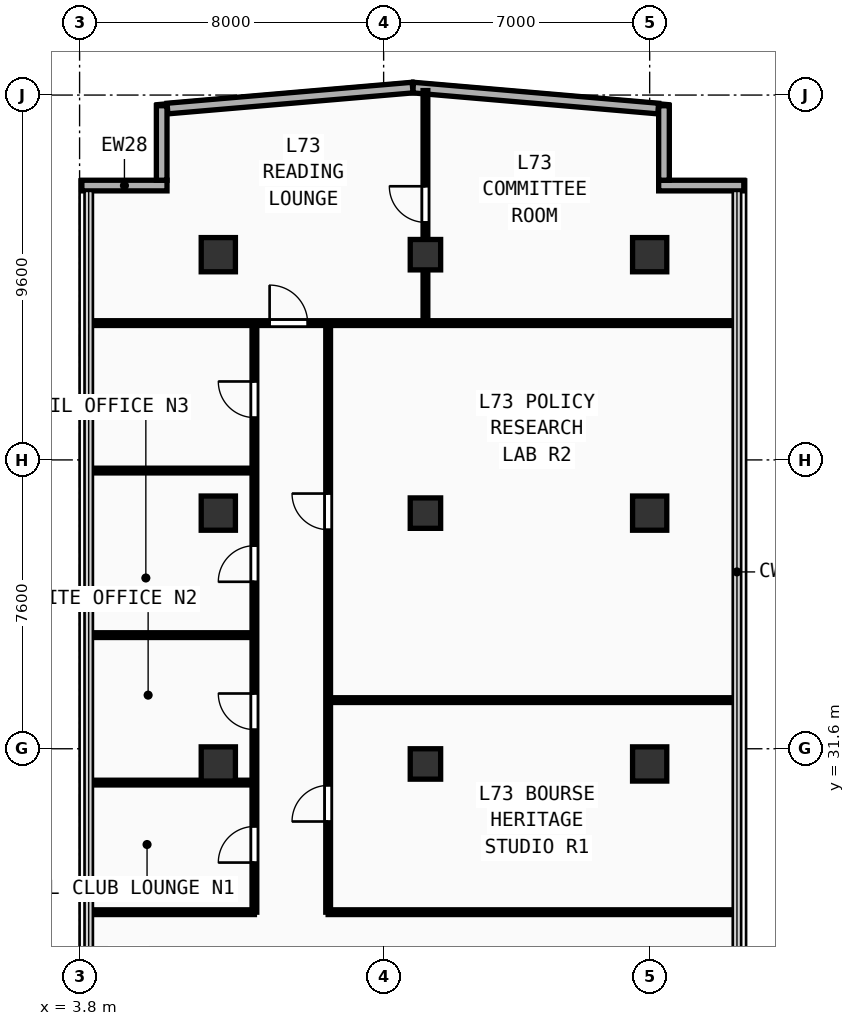
"""IFC4 building model, lengths in metres.
Left out: names, types, materials, properties, quantities, classifications, styles, units other than length and angle.
Written with IfcOpenShell. Run it as: python <this file> out.ifc"""

import sys

from ifc_helpers import new_model, si_unit, direction, frame, frame_2d, origin, origin_2d, place, context, subcontext, project, spatial, rectangle, extrude, element, fill, save


model = new_model("IFC4")
c1 = context("Model", 3, precision=1e-05, world=origin(), true_north=direction((0.0, 1.0)))
c2 = subcontext(c1, "Body", "Model", "MODEL_VIEW")
j1 = project(units=[si_unit("LENGTHUNIT", "METRE"), si_unit("PLANEANGLEUNIT", "RADIAN")], contexts=[c1])
p1 = place(None, origin())
s1 = spatial("IfcSite", under=j1, at=p1, CompositionType="ELEMENT")
p2 = place(p1, origin())
s2 = spatial("IfcBuilding", under=s1, at=p2, CompositionType="ELEMENT")
p3 = place(p2, frame((0.0, 0.0, 285.6)))
s3 = spatial("IfcBuildingStorey", under=s2, at=p3, CompositionType="ELEMENT", Elevation=285.6)
for number, where, z_axis, x_axis in (
    (1, (7.45, 31.2, 0.0), (0.0, 0.0, 1.0), (1.0, 0.0, 0.0)),
    (2, (7.45, 37.8, 0.0), (0.0, 0.0, 1.0), (1.0, 0.0, 0.0)),
    (3, (7.45, 44.6, 0.0), (0.0, 0.0, 1.0), (1.0, 0.0, 0.0)),
    (4, (18.8, 31.2, 0.0), (0.0, 0.0, 1.0), (1.0, 0.0, 0.0)),
    (5, (18.8, 37.8, 0.0), (0.0, 0.0, 1.0), (1.0, 0.0, 0.0)),
    (6, (18.8, 44.6, 0.0), (0.0, 0.0, 1.0), (1.0, 0.0, 0.0)),
):
    element("IfcColumn", number, at=place(p3, frame(where, z_axis=z_axis, x_axis=x_axis)), inside=s3, PredefinedType="COLUMN", context=c2, shape_type="SweptSolid", body=[
        extrude(rectangle(XDim=0.9, YDim=0.9, at=origin_2d()), origin(), (0.0, 0.0, 1.0), 3.56),
    ])
for number, where, z_axis, x_axis in (
    (7, (12.9, 31.2, 0.0), (0.0, 0.0, 1.0), (1.0, 0.0, 0.0)),
    (8, (12.9, 37.8, 0.0), (0.0, 0.0, 1.0), (1.0, 0.0, 0.0)),
    (9, (12.9, 44.6, 0.0), (0.0, 0.0, 1.0), (1.0, 0.0, 0.0)),
):
    element("IfcColumn", number, at=place(p3, frame(where, z_axis=z_axis, x_axis=x_axis)), inside=s3, PredefinedType="COLUMN", context=c2, shape_type="SweptSolid", body=[
        extrude(rectangle(XDim=0.8, YDim=0.8, at=origin_2d()), origin(), (0.0, 0.0, 1.0), 3.56),
    ])
p4 = place(p3, frame((19.037, 46.419, 0.0), z_axis=(0.0, 0.0, 1.0), x_axis=(1.0, 0.0, 0.0)))
e10 = element("IfcWall", 10, at=p4, inside=s3, PredefinedType="SOLIDWALL", context=c2, shape_type="SweptSolid", body=[
    extrude(rectangle(XDim=2.24, YDim=0.28, at=frame_2d((1.12, 0.0))), origin(), (0.0, 0.0, 1.0), 3.56),
])
p5 = place(p3, frame((19.177, 46.559, 0.0), z_axis=(0.0, 0.0, 1.0), x_axis=(0.0, 1.0, 0.0)))
e11 = element("IfcWall", 11, at=p5, inside=s3, PredefinedType="SOLIDWALL", context=c2, shape_type="SweptSolid", body=[
    extrude(rectangle(XDim=1.96, YDim=0.28, at=frame_2d((0.98, 0.0))), origin(), (0.0, 0.0, 1.0), 3.56),
])
p6 = place(p3, frame((3.86, 46.419, 0.0), z_axis=(0.0, 0.0, 1.0), x_axis=(1.0, 0.0, 0.0)))
e12 = element("IfcWall", 12, at=p6, inside=s3, PredefinedType="SOLIDWALL", context=c2, shape_type="SweptSolid", body=[
    extrude(rectangle(XDim=2.24, YDim=0.28, at=frame_2d((1.12, 0.0))), origin(), (0.0, 0.0, 1.0), 3.56),
])
p7 = place(p3, frame((5.96, 46.559, 0.0), z_axis=(0.0, 0.0, 1.0), x_axis=(0.0, 1.0, 0.0)))
e13 = element("IfcWall", 13, at=p7, inside=s3, PredefinedType="SOLIDWALL", context=c2, shape_type="SweptSolid", body=[
    extrude(rectangle(XDim=1.96, YDim=0.28, at=frame_2d((0.98, 0.0))), origin(), (0.0, 0.0, 1.0), 3.56),
])
p8 = place(p3, frame((19.024, 48.445, 0.0), z_axis=(0.0, 0.0, 1.0), x_axis=(-0.996363958027, 0.085198962116, 0.0)))
e14 = element("IfcWall", 14, at=p8, inside=s3, PredefinedType="SOLIDWALL", context=c2, shape_type="SweptSolid", body=[
    extrude(rectangle(XDim=6.473, YDim=0.28, at=frame_2d((3.237, 0.0))), origin(), (0.0, 0.0, 1.0), 3.56),
])
p9 = place(p3, frame((12.562, 48.997, 0.0), z_axis=(0.0, 0.0, 1.0), x_axis=(-0.996363684241, -0.08520216386, 0.0)))
e15 = element("IfcWall", 15, at=p9, inside=s3, PredefinedType="SOLIDWALL", context=c2, shape_type="SweptSolid", body=[
    extrude(rectangle(XDim=6.473, YDim=0.28, at=frame_2d((3.236, 0.0))), origin(), (0.0, 0.0, 1.0), 3.56),
])
p10 = place(p3, frame((4.04, 27.3, 0.0), z_axis=(0.0, 0.0, 1.0), x_axis=(1.0, 0.0, 0.0)))
e16 = element("IfcWall", 16, at=p10, inside=s3, PredefinedType="PARTITIONING", context=c2, shape_type="SweptSolid", body=[
    extrude(rectangle(XDim=4.36, YDim=0.125, at=frame_2d((2.18, 0.0))), origin(), (0.0, 0.0, 1.0), 3.56),
])
p11 = place(p3, frame((8.4, 27.3, 0.0), z_axis=(0.0, 0.0, 1.0), x_axis=(0.0, 1.0, 0.0)))
e17 = element("IfcWall", 17, at=p11, inside=s3, PredefinedType="PARTITIONING", context=c2, shape_type="SweptSolid", body=[
    extrude(rectangle(XDim=15.5, YDim=0.125, at=frame_2d((7.75, 0.0))), origin(), (0.0, 0.0, 1.0), 3.56),
])
p12 = place(p11, frame((1.305, 0.0, 0.0)))
e18 = element("IfcOpeningElement", 18, at=p12, cuts=e17, PredefinedType="OPENING", context=c2, shape_type="SweptSolid", body=[
    extrude(rectangle(XDim=0.95, YDim=2.15, at=frame_2d((0.475, 1.075))), frame((0.0, 0.073, 0.0), z_axis=(0.0, -1.0, 0.0), x_axis=(1.0, 0.0, 0.0)), (0.0, 0.0, 1.0), 0.145),
])
p13 = place(p11, frame((4.804, 0.0, 0.0)))
e19 = element("IfcOpeningElement", 19, at=p13, cuts=e17, PredefinedType="OPENING", context=c2, shape_type="SweptSolid", body=[
    extrude(rectangle(XDim=0.95, YDim=2.15, at=frame_2d((0.475, 1.075))), frame((0.0, 0.073, 0.0), z_axis=(0.0, -1.0, 0.0), x_axis=(1.0, 0.0, 0.0)), (0.0, 0.0, 1.0), 0.145),
])
p14 = place(p11, frame((8.693, 0.0, 0.0)))
e20 = element("IfcOpeningElement", 20, at=p14, cuts=e17, PredefinedType="OPENING", context=c2, shape_type="SweptSolid", body=[
    extrude(rectangle(XDim=0.95, YDim=2.15, at=frame_2d((0.475, 1.075))), frame((0.0, 0.073, 0.0), z_axis=(0.0, -1.0, 0.0), x_axis=(1.0, 0.0, 0.0)), (0.0, 0.0, 1.0), 0.145),
])
p15 = place(p11, frame((13.014, 0.0, 0.0)))
e21 = element("IfcOpeningElement", 21, at=p15, cuts=e17, PredefinedType="OPENING", context=c2, shape_type="SweptSolid", body=[
    extrude(rectangle(XDim=0.95, YDim=2.15, at=frame_2d((0.475, 1.075))), frame((0.0, 0.073, 0.0), z_axis=(0.0, -1.0, 0.0), x_axis=(1.0, 0.0, 0.0)), (0.0, 0.0, 1.0), 0.145),
])
for number, where, z_axis, x_axis in (
    (22, (4.04, 30.71, 0.0), (0.0, 0.0, 1.0), (1.0, 0.0, 0.0)),
    (23, (4.04, 34.59, 0.0), (0.0, 0.0, 1.0), (1.0, 0.0, 0.0)),
    (24, (4.04, 38.92, 0.0), (0.0, 0.0, 1.0), (1.0, 0.0, 0.0)),
):
    element("IfcWall", number, at=place(p3, frame(where, z_axis=z_axis, x_axis=x_axis)), inside=s3, PredefinedType="PARTITIONING", context=c2, shape_type="SweptSolid", body=[
        extrude(rectangle(XDim=4.36, YDim=0.125, at=frame_2d((2.18, 0.0))), origin(), (0.0, 0.0, 1.0), 3.56),
    ])
p16 = place(p3, frame((4.04, 42.8, 0.0), z_axis=(0.0, 0.0, 1.0), x_axis=(1.0, 0.0, 0.0)))
e25 = element("IfcWall", 25, at=p16, inside=s3, PredefinedType="PARTITIONING", context=c2, shape_type="SweptSolid", body=[
    extrude(rectangle(XDim=17.12, YDim=0.125, at=frame_2d((8.56, 0.0))), origin(), (0.0, 0.0, 1.0), 3.56),
])
p17 = place(p16, frame((4.76, 0.0, 0.0)))
e26 = element("IfcOpeningElement", 26, at=p17, cuts=e25, PredefinedType="OPENING", context=c2, shape_type="SweptSolid", body=[
    extrude(rectangle(XDim=1.0, YDim=2.2, at=frame_2d((0.5, 1.1))), frame((0.0, 0.073, 0.0), z_axis=(0.0, -1.0, 0.0), x_axis=(1.0, 0.0, 0.0)), (0.0, 0.0, 1.0), 0.145),
])
p18 = place(p3, frame((12.9, 42.8, 0.0), z_axis=(0.0, 0.0, 1.0), x_axis=(0.0, 1.0, 0.0)))
e27 = element("IfcWall", 27, at=p18, inside=s3, PredefinedType="PARTITIONING", context=c2, shape_type="SweptSolid", body=[
    extrude(rectangle(XDim=6.118, YDim=0.125, at=frame_2d((3.059, 0.0))), origin(), (0.0, 0.0, 1.0), 2.798),
])
p19 = place(p18, frame((2.65, 0.0, 0.0)))
e28 = element("IfcOpeningElement", 28, at=p19, cuts=e27, PredefinedType="OPENING", context=c2, shape_type="SweptSolid", body=[
    extrude(rectangle(XDim=0.95, YDim=2.15, at=frame_2d((0.475, 1.075))), frame((0.0, 0.073, 0.0), z_axis=(0.0, -1.0, 0.0), x_axis=(1.0, 0.0, 0.0)), (0.0, 0.0, 1.0), 0.145),
])
p20 = place(p3, frame((10.34, 27.3, 0.0), z_axis=(0.0, 0.0, 1.0), x_axis=(1.0, 0.0, 0.0)))
e29 = element("IfcWall", 29, at=p20, inside=s3, PredefinedType="PARTITIONING", context=c2, shape_type="SweptSolid", body=[
    extrude(rectangle(XDim=10.82, YDim=0.125, at=frame_2d((5.41, 0.0))), origin(), (0.0, 0.0, 1.0), 3.56),
])
p21 = place(p3, frame((10.34, 27.3, 0.0), z_axis=(0.0, 0.0, 1.0), x_axis=(0.0, 1.0, 0.0)))
e30 = element("IfcWall", 30, at=p21, inside=s3, PredefinedType="PARTITIONING", context=c2, shape_type="SweptSolid", body=[
    extrude(rectangle(XDim=15.5, YDim=0.125, at=frame_2d((7.75, 0.0))), origin(), (0.0, 0.0, 1.0), 3.56),
])
p22 = place(p21, frame((2.386, 0.0, 0.0)))
e31 = element("IfcOpeningElement", 31, at=p22, cuts=e30, PredefinedType="OPENING", context=c2, shape_type="SweptSolid", body=[
    extrude(rectangle(XDim=0.95, YDim=2.15, at=frame_2d((0.475, 1.075))), frame((0.0, 0.073, 0.0), z_axis=(0.0, -1.0, 0.0), x_axis=(1.0, 0.0, 0.0)), (0.0, 0.0, 1.0), 0.145),
])
p23 = place(p21, frame((10.065, 0.0, 0.0)))
e32 = element("IfcOpeningElement", 32, at=p23, cuts=e30, PredefinedType="OPENING", context=c2, shape_type="SweptSolid", body=[
    extrude(rectangle(XDim=0.95, YDim=2.15, at=frame_2d((0.475, 1.075))), frame((0.0, 0.073, 0.0), z_axis=(0.0, -1.0, 0.0), x_axis=(1.0, 0.0, 0.0)), (0.0, 0.0, 1.0), 0.145),
])
p24 = place(p3, frame((10.34, 32.88, 0.0), z_axis=(0.0, 0.0, 1.0), x_axis=(1.0, 0.0, 0.0)))
e33 = element("IfcWall", 33, at=p24, inside=s3, PredefinedType="PARTITIONING", context=c2, shape_type="SweptSolid", body=[
    extrude(rectangle(XDim=10.82, YDim=0.125, at=frame_2d((5.41, 0.0))), origin(), (0.0, 0.0, 1.0), 3.56),
])
p25 = place(p12, origin())
e34 = element("IfcDoor", 34, at=p25, inside=s3, OperationType="SINGLE_SWING_LEFT", PredefinedType="DOOR", context=c2, shape_type="SweptSolid", body=[
    extrude(rectangle(XDim=0.95, YDim=2.15, at=frame_2d((0.475, 1.075))), frame((0.0, 0.025, 0.0), z_axis=(0.0, -1.0, 0.0), x_axis=(1.0, 0.0, 0.0)), (0.0, 0.0, 1.0), 0.05),
])
fill(e18, e34)
p26 = place(p13, origin())
e35 = element("IfcDoor", 35, at=p26, inside=s3, OperationType="SINGLE_SWING_RIGHT", PredefinedType="DOOR", context=c2, shape_type="SweptSolid", body=[
    extrude(rectangle(XDim=0.95, YDim=2.15, at=frame_2d((0.475, 1.075))), frame((0.0, 0.025, 0.0), z_axis=(0.0, -1.0, 0.0), x_axis=(1.0, 0.0, 0.0)), (0.0, 0.0, 1.0), 0.05),
])
fill(e19, e35)
p27 = place(p14, origin())
e36 = element("IfcDoor", 36, at=p27, inside=s3, OperationType="SINGLE_SWING_LEFT", PredefinedType="DOOR", context=c2, shape_type="SweptSolid", body=[
    extrude(rectangle(XDim=0.95, YDim=2.15, at=frame_2d((0.475, 1.075))), frame((0.0, 0.025, 0.0), z_axis=(0.0, -1.0, 0.0), x_axis=(1.0, 0.0, 0.0)), (0.0, 0.0, 1.0), 0.05),
])
fill(e20, e36)
p28 = place(p15, origin())
e37 = element("IfcDoor", 37, at=p28, inside=s3, OperationType="SINGLE_SWING_RIGHT", PredefinedType="DOOR", context=c2, shape_type="SweptSolid", body=[
    extrude(rectangle(XDim=0.95, YDim=2.15, at=frame_2d((0.475, 1.075))), frame((0.0, 0.025, 0.0), z_axis=(0.0, -1.0, 0.0), x_axis=(1.0, 0.0, 0.0)), (0.0, 0.0, 1.0), 0.05),
])
fill(e21, e37)
p29 = place(p17, origin())
e38 = element("IfcDoor", 38, at=p29, inside=s3, OperationType="SINGLE_SWING_LEFT", PredefinedType="DOOR", context=c2, shape_type="SweptSolid", body=[
    extrude(rectangle(XDim=1.0, YDim=2.2, at=frame_2d((0.5, 1.1))), frame((0.0, 0.025, 0.0), z_axis=(0.0, -1.0, 0.0), x_axis=(1.0, 0.0, 0.0)), (0.0, 0.0, 1.0), 0.05),
])
fill(e26, e38)
p30 = place(p19, origin())
e39 = element("IfcDoor", 39, at=p30, inside=s3, OperationType="SINGLE_SWING_RIGHT", PredefinedType="DOOR", context=c2, shape_type="SweptSolid", body=[
    extrude(rectangle(XDim=0.95, YDim=2.15, at=frame_2d((0.475, 1.075))), frame((0.0, 0.025, 0.0), z_axis=(0.0, -1.0, 0.0), x_axis=(1.0, 0.0, 0.0)), (0.0, 0.0, 1.0), 0.05),
])
fill(e28, e39)
p31 = place(p22, origin())
e40 = element("IfcDoor", 40, at=p31, inside=s3, OperationType="SINGLE_SWING_LEFT", PredefinedType="DOOR", context=c2, shape_type="SweptSolid", body=[
    extrude(rectangle(XDim=0.95, YDim=2.15, at=frame_2d((0.475, 1.075))), frame((0.0, 0.025, 0.0), z_axis=(0.0, -1.0, 0.0), x_axis=(1.0, 0.0, 0.0)), (0.0, 0.0, 1.0), 0.05),
])
fill(e31, e40)
p32 = place(p23, origin())
e41 = element("IfcDoor", 41, at=p32, inside=s3, OperationType="SINGLE_SWING_RIGHT", PredefinedType="DOOR", context=c2, shape_type="SweptSolid", body=[
    extrude(rectangle(XDim=0.95, YDim=2.15, at=frame_2d((0.475, 1.075))), frame((0.0, 0.025, 0.0), z_axis=(0.0, -1.0, 0.0), x_axis=(1.0, 0.0, 0.0)), (0.0, 0.0, 1.0), 0.05),
])
fill(e32, e41)
save(model, sys.argv[1])
